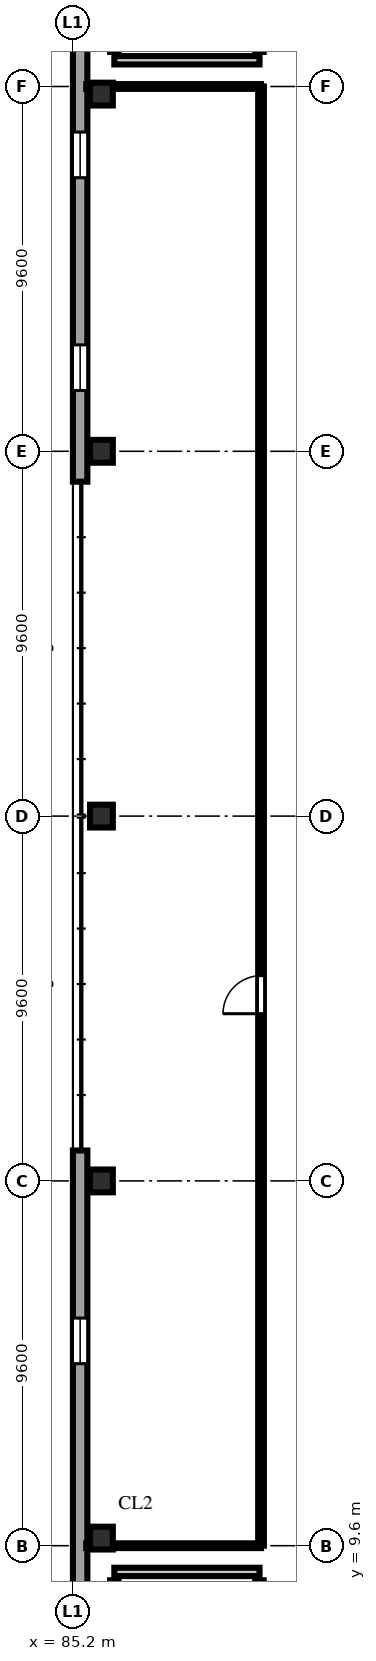
"""IFC4 building model, lengths in metres.
Left out: names, types, materials, properties, quantities, classifications, styles, units other than length and angle.
Written with IfcOpenShell. Run it as: python <this file> out.ifc"""

import sys

from ifc_helpers import new_model, si_unit, direction, frame, frame_2d, origin, origin_2d, place, context, subcontext, project, spatial, rectangle, extrude, element, fill, save


model = new_model("IFC4")
c1 = context("Model", 3, precision=1e-05, world=origin(), true_north=direction((0.0, 1.0)))
c2 = subcontext(c1, "Body", "Model", "MODEL_VIEW")
j1 = project(units=[si_unit("LENGTHUNIT", "METRE"), si_unit("PLANEANGLEUNIT", "RADIAN")], contexts=[c1])
p1 = place(None, origin())
s1 = spatial("IfcSite", under=j1, at=p1, CompositionType="ELEMENT")
p2 = place(p1, origin())
s2 = spatial("IfcBuilding", under=s1, at=p2, CompositionType="ELEMENT")
p3 = place(p2, frame((0.0, 0.0, 15.0)))
s3 = spatial("IfcBuildingStorey", under=s2, at=p3, CompositionType="ELEMENT", Elevation=15.0)
for number, where, z_axis, x_axis in (
    (1, (85.95, 9.8, 0.0), (0.0, 0.0, 1.0), (1.0, 0.0, 0.0)),
    (2, (85.95, 19.2, 0.0), (0.0, 0.0, 1.0), (1.0, 0.0, 0.0)),
    (3, (85.95, 28.8, 0.0), (0.0, 0.0, 1.0), (1.0, 0.0, 0.0)),
    (4, (85.95, 38.4, 0.0), (0.0, 0.0, 1.0), (1.0, 0.0, 0.0)),
    (5, (85.95, 47.8, 0.0), (0.0, 0.0, 1.0), (1.0, 0.0, 0.0)),
):
    element("IfcColumn", number, at=place(p3, frame(where, z_axis=z_axis, x_axis=x_axis)), inside=s3, PredefinedType="COLUMN", context=c2, shape_type="SweptSolid", body=[
        extrude(rectangle(XDim=0.6, YDim=0.6, at=origin_2d()), origin(), (0.0, 0.0, 1.0), 4.6),
    ])
p4 = place(p3, frame((85.39, 0.19, 0.0), z_axis=(0.0, 0.0, 1.0), x_axis=(0.0, 1.0, 0.0)))
e6 = element("IfcWall", 6, at=p4, inside=s3, PredefinedType="SOLIDWALL", context=c2, shape_type="SweptSolid", body=[
    extrude(rectangle(XDim=19.81, YDim=0.38, at=frame_2d((9.905, 0.0))), origin(), (0.0, 0.0, 1.0), 4.25),
])
p5 = place(p4, frame((4.8, 0.0, 1.25)))
e7 = element("IfcOpeningElement", 7, at=p5, cuts=e6, PredefinedType="OPENING", context=c2, shape_type="SweptSolid", body=[
    extrude(rectangle(XDim=1.2, YDim=1.65, at=frame_2d((0.6, 0.825))), frame((0.0, 0.202, 0.0), z_axis=(0.0, -1.0, 0.0), x_axis=(1.0, 0.0, 0.0)), (0.0, 0.0, 1.0), 0.404),
])
p6 = place(p4, frame((14.2, 0.0, 1.25)))
e8 = element("IfcOpeningElement", 8, at=p6, cuts=e6, PredefinedType="OPENING", context=c2, shape_type="SweptSolid", body=[
    extrude(rectangle(XDim=1.2, YDim=1.65, at=frame_2d((0.6, 0.825))), frame((0.0, 0.202, 0.0), z_axis=(0.0, -1.0, 0.0), x_axis=(1.0, 0.0, 0.0)), (0.0, 0.0, 1.0), 0.404),
])
p7 = place(p3, frame((85.39, 37.6, 0.0), z_axis=(0.0, 0.0, 1.0), x_axis=(0.0, 1.0, 0.0)))
e9 = element("IfcWall", 9, at=p7, inside=s3, PredefinedType="SOLIDWALL", context=c2, shape_type="SweptSolid", body=[
    extrude(rectangle(XDim=19.81, YDim=0.38, at=frame_2d((9.905, 0.0))), origin(), (0.0, 0.0, 1.0), 4.25),
])
p8 = place(p7, frame((2.4, 0.0, 1.25)))
e10 = element("IfcOpeningElement", 10, at=p8, cuts=e9, PredefinedType="OPENING", context=c2, shape_type="SweptSolid", body=[
    extrude(rectangle(XDim=1.2, YDim=1.65, at=frame_2d((0.6, 0.825))), frame((0.0, 0.202, 0.0), z_axis=(0.0, -1.0, 0.0), x_axis=(1.0, 0.0, 0.0)), (0.0, 0.0, 1.0), 0.404),
])
p9 = place(p7, frame((8.0, 0.0, 1.25)))
e11 = element("IfcOpeningElement", 11, at=p9, cuts=e9, PredefinedType="OPENING", context=c2, shape_type="SweptSolid", body=[
    extrude(rectangle(XDim=1.2, YDim=1.65, at=frame_2d((0.6, 0.825))), frame((0.0, 0.202, 0.0), z_axis=(0.0, -1.0, 0.0), x_axis=(1.0, 0.0, 0.0)), (0.0, 0.0, 1.0), 0.404),
])
p10 = place(p3, frame((86.29, 1.31, 0.0), z_axis=(0.0, 0.0, 1.0), x_axis=(0.0, 1.0, 0.0)))
e12 = element("IfcWall", 12, at=p10, inside=s3, PredefinedType="SOLIDWALL", context=c2, shape_type="SweptSolid", body=[
    extrude(rectangle(XDim=7.38, YDim=0.22, at=frame_2d((3.69, 0.0))), origin(), (0.0, 0.0, 1.0), 4.25),
])
p11 = place(p3, frame((86.29, 8.91, 0.0), z_axis=(0.0, 0.0, 1.0), x_axis=(1.0, 0.0, 0.0)))
e13 = element("IfcWall", 13, at=p11, inside=s3, PredefinedType="SOLIDWALL", context=c2, shape_type="SweptSolid", body=[
    extrude(rectangle(XDim=3.82, YDim=0.22, at=frame_2d((1.91, 0.0))), origin(), (0.0, 0.0, 1.0), 4.25),
])
p12 = place(p3, frame((90.11, 1.31, 0.0), z_axis=(0.0, 0.0, 1.0), x_axis=(0.0, 1.0, 0.0)))
e14 = element("IfcWall", 14, at=p12, inside=s3, PredefinedType="SOLIDWALL", context=c2, shape_type="SweptSolid", body=[
    extrude(rectangle(XDim=7.38, YDim=0.22, at=frame_2d((3.69, 0.0))), origin(), (0.0, 0.0, 1.0), 4.25),
])
p13 = place(p12, frame((0.14, 0.0, 0.0)))
e15 = element("IfcOpeningElement", 15, at=p13, cuts=e14, PredefinedType="OPENING", context=c2, shape_type="SweptSolid", body=[
    extrude(rectangle(XDim=1.1, YDim=2.2, at=frame_2d((0.55, 1.1))), frame((0.0, 0.122, 0.0), z_axis=(0.0, -1.0, 0.0), x_axis=(1.0, 0.0, 0.0)), (0.0, 0.0, 1.0), 0.244),
])
p14 = place(p3, frame((86.29, 48.91, 0.0), z_axis=(0.0, 0.0, 1.0), x_axis=(0.0, 1.0, 0.0)))
e16 = element("IfcWall", 16, at=p14, inside=s3, PredefinedType="SOLIDWALL", context=c2, shape_type="SweptSolid", body=[
    extrude(rectangle(XDim=7.38, YDim=0.22, at=frame_2d((3.69, 0.0))), origin(), (0.0, 0.0, 1.0), 4.25),
])
p15 = place(p3, frame((86.29, 48.69, 0.0), z_axis=(0.0, 0.0, 1.0), x_axis=(1.0, 0.0, 0.0)))
e17 = element("IfcWall", 17, at=p15, inside=s3, PredefinedType="SOLIDWALL", context=c2, shape_type="SweptSolid", body=[
    extrude(rectangle(XDim=3.82, YDim=0.22, at=frame_2d((1.91, 0.0))), origin(), (0.0, 0.0, 1.0), 4.25),
])
p16 = place(p3, frame((90.11, 48.91, 0.0), z_axis=(0.0, 0.0, 1.0), x_axis=(0.0, 1.0, 0.0)))
e18 = element("IfcWall", 18, at=p16, inside=s3, PredefinedType="SOLIDWALL", context=c2, shape_type="SweptSolid", body=[
    extrude(rectangle(XDim=7.38, YDim=0.22, at=frame_2d((3.69, 0.0))), origin(), (0.0, 0.0, 1.0), 4.25),
])
p17 = place(p16, frame((0.14, 0.0, 0.0)))
e19 = element("IfcOpeningElement", 19, at=p17, cuts=e18, PredefinedType="OPENING", context=c2, shape_type="SweptSolid", body=[
    extrude(rectangle(XDim=1.1, YDim=2.2, at=frame_2d((0.55, 1.1))), frame((0.0, 0.122, 0.0), z_axis=(0.0, -1.0, 0.0), x_axis=(1.0, 0.0, 0.0)), (0.0, 0.0, 1.0), 0.244),
])
p18 = place(p3, frame((85.55, 9.6, 0.0), z_axis=(0.0, 0.0, 1.0), x_axis=(1.0, 0.0, 0.0)))
e20 = element("IfcWall", 20, at=p18, inside=s3, PredefinedType="PARTITIONING", context=c2, shape_type="SweptSolid", body=[
    extrude(rectangle(XDim=0.4, YDim=0.125, at=frame_2d((0.2, 0.0))), origin(), (0.0, 0.0, 1.0), 4.25),
])
p19 = place(p3, frame((85.95, 9.6, 0.0), z_axis=(0.0, 0.0, 1.0), x_axis=(1.0, 0.0, 0.0)))
e21 = element("IfcWall", 21, at=p19, inside=s3, PredefinedType="PARTITIONING", context=c2, shape_type="SweptSolid", body=[
    extrude(rectangle(XDim=4.2, YDim=0.125, at=frame_2d((2.1, 0.0))), origin(), (0.0, 0.0, 1.0), 3.45),
])
p20 = place(p3, frame((85.55, 48.0, 0.0), z_axis=(0.0, 0.0, 1.0), x_axis=(1.0, 0.0, 0.0)))
e22 = element("IfcWall", 22, at=p20, inside=s3, PredefinedType="PARTITIONING", context=c2, shape_type="SweptSolid", body=[
    extrude(rectangle(XDim=0.4, YDim=0.125, at=frame_2d((0.2, 0.0))), origin(), (0.0, 0.0, 1.0), 4.25),
])
p21 = place(p3, frame((85.95, 48.0, 0.0), z_axis=(0.0, 0.0, 1.0), x_axis=(1.0, 0.0, 0.0)))
e23 = element("IfcWall", 23, at=p21, inside=s3, PredefinedType="PARTITIONING", context=c2, shape_type="SweptSolid", body=[
    extrude(rectangle(XDim=4.2, YDim=0.125, at=frame_2d((2.1, 0.0))), origin(), (0.0, 0.0, 1.0), 3.45),
])
p22 = place(p3, frame((90.15, 9.6, 0.0), z_axis=(0.0, 0.0, 1.0), x_axis=(0.0, 1.0, 0.0)))
e24 = element("IfcWall", 24, at=p22, inside=s3, PredefinedType="PARTITIONING", context=c2, shape_type="SweptSolid", body=[
    extrude(rectangle(XDim=38.4, YDim=0.15, at=frame_2d((19.2, 0.0))), origin(), (0.0, 0.0, 1.0), 4.25),
])
p23 = place(p22, frame((14.0, 0.0, 0.0)))
e25 = element("IfcOpeningElement", 25, at=p23, cuts=e24, PredefinedType="OPENING", context=c2, shape_type="SweptSolid", body=[
    extrude(rectangle(XDim=1.0, YDim=2.2, at=frame_2d((0.5, 1.1))), frame((0.0, 0.087, 0.0), z_axis=(0.0, -1.0, 0.0), x_axis=(1.0, 0.0, 0.0)), (0.0, 0.0, 1.0), 0.174),
])
p24 = place(p6, origin())
e26 = element("IfcWindow", 26, at=p24, inside=s3, PartitioningType="SINGLE_PANEL", PredefinedType="WINDOW", context=c2, shape_type="SweptSolid", body=[
    extrude(rectangle(XDim=1.2, YDim=1.65, at=frame_2d((0.6, 0.825))), frame((0.0, 0.11, 0.0), z_axis=(0.0, -1.0, 0.0), x_axis=(1.0, 0.0, 0.0)), (0.0, 0.0, 1.0), 0.06),
])
fill(e8, e26)
p25 = place(p8, origin())
e27 = element("IfcWindow", 27, at=p25, inside=s3, PartitioningType="SINGLE_PANEL", PredefinedType="WINDOW", context=c2, shape_type="SweptSolid", body=[
    extrude(rectangle(XDim=1.2, YDim=1.65, at=frame_2d((0.6, 0.825))), frame((0.0, 0.11, 0.0), z_axis=(0.0, -1.0, 0.0), x_axis=(1.0, 0.0, 0.0)), (0.0, 0.0, 1.0), 0.06),
])
fill(e10, e27)
p26 = place(p9, origin())
e28 = element("IfcWindow", 28, at=p26, inside=s3, PartitioningType="SINGLE_PANEL", PredefinedType="WINDOW", context=c2, shape_type="SweptSolid", body=[
    extrude(rectangle(XDim=1.2, YDim=1.65, at=frame_2d((0.6, 0.825))), frame((0.0, 0.11, 0.0), z_axis=(0.0, -1.0, 0.0), x_axis=(1.0, 0.0, 0.0)), (0.0, 0.0, 1.0), 0.06),
])
fill(e11, e28)
p27 = place(p23, origin())
e29 = element("IfcDoor", 29, at=p27, inside=s3, OperationType="SINGLE_SWING_LEFT", PredefinedType="DOOR", context=c2, shape_type="SweptSolid", body=[
    extrude(rectangle(XDim=1.0, YDim=2.2, at=frame_2d((0.5, 1.1))), frame((0.0, 0.025, 0.0), z_axis=(0.0, -1.0, 0.0), x_axis=(1.0, 0.0, 0.0)), (0.0, 0.0, 1.0), 0.05),
])
fill(e25, e29)
save(model, sys.argv[1])
